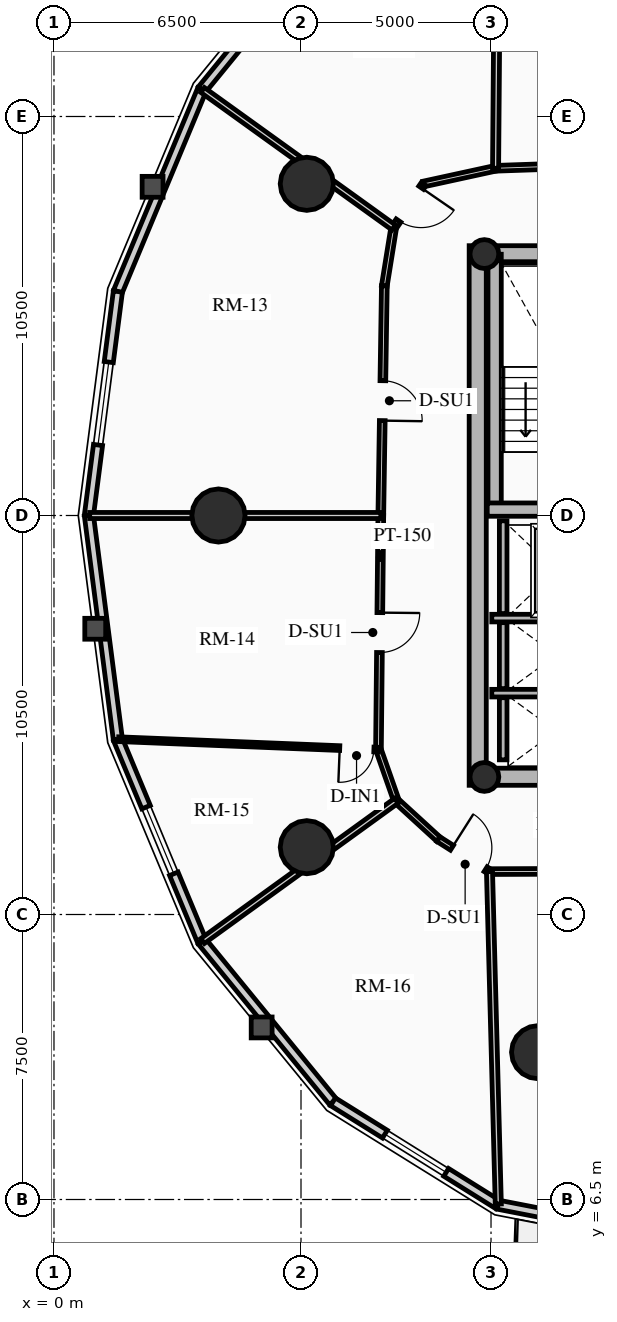
"""IFC4 building model, lengths in metres.
Left out: names, types, materials, properties, quantities, classifications, styles, units other than length and angle.
Written with IfcOpenShell. Run it as: python <this file> out.ifc"""

import sys

from ifc_helpers import new_model, si_unit, direction, frame, frame_2d, origin, origin_2d, place, context, subcontext, project, spatial, rectangle, circle, hollow_circle, extrude, source, transform, mapped, element, fill, save


model = new_model("IFC4")
c1 = context("Model", 3, precision=1e-05, world=origin(), true_north=direction((0.0, 1.0)))
c2 = subcontext(c1, "Body", "Model", "MODEL_VIEW")
j1 = project(units=[si_unit("LENGTHUNIT", "METRE"), si_unit("PLANEANGLEUNIT", "RADIAN")], contexts=[c1])
p1 = place(None, origin())
s1 = spatial("IfcSite", under=j1, at=p1, CompositionType="ELEMENT")
p2 = place(p1, origin())
s2 = spatial("IfcBuilding", under=s1, at=p2, CompositionType="ELEMENT")
p3 = place(p2, frame((0.0, 0.0, 78.88)))
s3 = spatial("IfcBuildingStorey", under=s2, at=p3, CompositionType="ELEMENT", Elevation=78.88)
p4 = place(p3, frame((11.15, 17.4, 0.0), z_axis=(0.0, 0.0, 1.0), x_axis=(0.0, 1.0, 0.0)))
e1 = element("IfcWall", 1, at=p4, inside=s3, PredefinedType="SHEAR", context=c2, shape_type="SweptSolid", body=[
    extrude(rectangle(XDim=14.2, YDim=0.45, at=frame_2d((7.1, 0.0))), origin(), (0.0, 0.0, 1.0), 2.91),
])
p5 = place(p3, frame((11.15, 17.625, 0.0), z_axis=(0.0, 0.0, 1.0), x_axis=(1.0, 0.0, 0.0)))
e2 = element("IfcWall", 2, at=p5, inside=s3, PredefinedType="SHEAR", context=c2, shape_type="SweptSolid", body=[
    extrude(rectangle(XDim=10.7, YDim=0.45, at=frame_2d((5.35, 0.0))), origin(), (0.0, 0.0, 1.0), 2.91),
])
m1 = source(origin(), c2, "Body", "SweptSolid", [
    extrude(rectangle(XDim=1.5, YDim=2.02, at=frame_2d((0.75, 1.01))), frame((0.0, 0.235, 0.0), z_axis=(0.0, -1.0, 0.0), x_axis=(1.0, 0.0, 0.0)), (0.0, 0.0, 1.0), 0.47),
])
p6 = place(p5, frame((5.45, 0.0, 0.0)))
e3 = element("IfcOpeningElement", 3, at=p6, cuts=e2, PredefinedType="OPENING", context=c2, shape_type="MappedRepresentation", body=[
    mapped(m1, transform((0.0, 0.0, 0.0), x_axis=(1.0, 0.0, 0.0), y_axis=(0.0, 1.0, 0.0), z_axis=(0.0, 0.0, 1.0), scale=1.0)),
])
p7 = place(p3, frame((11.15, 31.375, 0.0), z_axis=(0.0, 0.0, 1.0), x_axis=(1.0, 0.0, 0.0)))
e4 = element("IfcWall", 4, at=p7, inside=s3, PredefinedType="SHEAR", context=c2, shape_type="SweptSolid", body=[
    extrude(rectangle(XDim=10.7, YDim=0.45, at=frame_2d((5.35, 0.0))), origin(), (0.0, 0.0, 1.0), 2.91),
])
p8 = place(p7, frame((4.6, 0.0, 0.0)))
e5 = element("IfcOpeningElement", 5, at=p8, cuts=e4, PredefinedType="OPENING", context=c2, shape_type="MappedRepresentation", body=[
    mapped(m1, transform((0.0, 0.0, 0.0), x_axis=(1.0, 0.0, 0.0), y_axis=(0.0, 1.0, 0.0), z_axis=(0.0, 0.0, 1.0), scale=1.0)),
])
p9 = place(p3, frame((11.595, 24.655, 0.0), z_axis=(0.0, 0.0, 1.0), x_axis=(0.0, 1.0, 0.0)))
e6 = element("IfcWall", 6, at=p9, inside=s3, PredefinedType="SHEAR", context=c2, shape_type="SweptSolid", body=[
    extrude(rectangle(XDim=6.72, YDim=0.35, at=frame_2d((3.36, 0.0))), origin(), (0.0, 0.0, 1.0), 2.91),
])
p10 = place(p3, frame((11.4, 24.655, 0.0), z_axis=(0.0, 0.0, 1.0), x_axis=(1.0, 0.0, 0.0)))
e7 = element("IfcWall", 7, at=p10, inside=s3, PredefinedType="SHEAR", context=c2, shape_type="SweptSolid", body=[
    extrude(rectangle(XDim=3.285, YDim=0.35, at=frame_2d((1.643, 0.0))), origin(), (0.0, 0.0, 1.0), 2.91),
])
for number, where, z_axis, x_axis in (
    (8, (11.325, 17.62, 0.0), (0.0, 0.0, 1.0), (1.0, 0.0, 0.0)),
    (9, (11.325, 31.38, 0.0), (0.0, 0.0, 1.0), (1.0, 0.0, 0.0)),
):
    element("IfcColumn", number, at=place(p3, frame(where, z_axis=z_axis, x_axis=x_axis)), inside=s3, PredefinedType="COLUMN", context=c2, shape_type="SweptSolid", body=[
        extrude(hollow_circle(Radius=0.38, WallThickness=0.032, at=origin_2d()), origin(), (0.0, 0.0, 1.0), 2.91),
    ])
for number, where, z_axis, x_axis in (
    (10, (6.653, 33.229, 0.0), (0.0, 0.0, 1.0), (1.0, 0.0, 0.0)),
    (11, (4.328, 24.5, 0.0), (0.0, 0.0, 1.0), (1.0, 0.0, 0.0)),
    (12, (6.653, 15.771, 0.0), (0.0, 0.0, 1.0), (1.0, 0.0, 0.0)),
    (13, (12.739, 10.377, 0.0), (0.0, 0.0, 1.0), (1.0, 0.0, 0.0)),
):
    element("IfcColumn", number, at=place(p3, frame(where, z_axis=z_axis, x_axis=x_axis)), inside=s3, PredefinedType="USERDEFINED", context=c2, shape_type="SweptSolid", body=[
        extrude(circle(Radius=0.7, at=origin_2d()), origin(), (0.0, 0.0, 1.0), 2.91),
    ])
p11 = place(p3, frame((3.895, 35.709, 0.0), z_axis=(0.0, 0.0, 1.0), x_axis=(0.632700781152, 0.77439635945, 0.0)))
e14 = element("IfcWall", 14, at=p11, inside=s3, PredefinedType="SOLIDWALL", context=c2, shape_type="SweptSolid", body=[
    extrude(rectangle(XDim=5.448, YDim=0.24, at=frame_2d((2.724, 0.0))), origin(), (0.0, 0.0, 1.0), 2.179),
])
m2 = source(origin(), c2, "Body", "SweptSolid", [
    extrude(rectangle(XDim=1.9, YDim=1.35, at=frame_2d((0.95, 0.675))), frame((0.0, 0.13, 0.0), z_axis=(0.0, -1.0, 0.0), x_axis=(1.0, 0.0, 0.0)), (0.0, 0.0, 1.0), 0.26),
])
p12 = place(p11, frame((1.774, 0.0, 0.65)))
e15 = element("IfcOpeningElement", 15, at=p12, cuts=e14, PredefinedType="OPENING", context=c2, shape_type="MappedRepresentation", body=[
    mapped(m2, transform((0.0, 0.0, 0.0), x_axis=(1.0, 0.0, 0.0), y_axis=(0.0, 1.0, 0.0), z_axis=(0.0, 0.0, 1.0), scale=1.0)),
])
p13 = place(p3, frame((1.682, 30.393, 0.0), z_axis=(0.0, 0.0, 1.0), x_axis=(0.384344417632, 0.923189779317, 0.0)))
e16 = element("IfcWall", 16, at=p13, inside=s3, PredefinedType="SOLIDWALL", context=c2, shape_type="SweptSolid", body=[
    extrude(rectangle(XDim=5.758, YDim=0.24, at=frame_2d((2.879, 0.0))), origin(), (0.0, 0.0, 1.0), 2.179),
])
p14 = place(p3, frame((0.919, 24.5, 0.0), z_axis=(0.0, 0.0, 1.0), x_axis=(0.128351991996, 0.991728675672, 0.0)))
e17 = element("IfcWall", 17, at=p14, inside=s3, PredefinedType="SOLIDWALL", context=c2, shape_type="SweptSolid", body=[
    extrude(rectangle(XDim=5.942, YDim=0.24, at=frame_2d((2.971, 0.0))), origin(), (0.0, 0.0, 1.0), 2.179),
])
m3 = source(origin(), c2, "Body", "SweptSolid", [
    extrude(rectangle(XDim=2.2, YDim=1.35, at=frame_2d((1.1, 0.675))), frame((0.0, 0.13, 0.0), z_axis=(0.0, -1.0, 0.0), x_axis=(1.0, 0.0, 0.0)), (0.0, 0.0, 1.0), 0.26),
])
p15 = place(p14, frame((1.871, 0.0, 0.65)))
e18 = element("IfcOpeningElement", 18, at=p15, cuts=e17, PredefinedType="OPENING", context=c2, shape_type="MappedRepresentation", body=[
    mapped(m3, transform((0.0, 0.0, 0.0), x_axis=(1.0, 0.0, 0.0), y_axis=(0.0, 1.0, 0.0), z_axis=(0.0, 0.0, 1.0), scale=1.0)),
])
p16 = place(p3, frame((1.682, 18.607, 0.0), z_axis=(0.0, 0.0, 1.0), x_axis=(-0.128351991996, 0.991728675672, 0.0)))
e19 = element("IfcWall", 19, at=p16, inside=s3, PredefinedType="SOLIDWALL", context=c2, shape_type="SweptSolid", body=[
    extrude(rectangle(XDim=5.942, YDim=0.24, at=frame_2d((2.971, 0.0))), origin(), (0.0, 0.0, 1.0), 2.179),
])
p17 = place(p3, frame((3.895, 13.291, 0.0), z_axis=(0.0, 0.0, 1.0), x_axis=(-0.384344417632, 0.923189779317, 0.0)))
e20 = element("IfcWall", 20, at=p17, inside=s3, PredefinedType="SOLIDWALL", context=c2, shape_type="SweptSolid", body=[
    extrude(rectangle(XDim=5.758, YDim=0.24, at=frame_2d((2.879, 0.0))), origin(), (0.0, 0.0, 1.0), 2.179),
])
p18 = place(p17, frame((1.929, 0.0, 0.65)))
e21 = element("IfcOpeningElement", 21, at=p18, cuts=e20, PredefinedType="OPENING", context=c2, shape_type="MappedRepresentation", body=[
    mapped(m2, transform((0.0, 0.0, 0.0), x_axis=(1.0, 0.0, 0.0), y_axis=(0.0, 1.0, 0.0), z_axis=(0.0, 0.0, 1.0), scale=1.0)),
])
p19 = place(p3, frame((7.342, 9.072, 0.0), z_axis=(0.0, 0.0, 1.0), x_axis=(-0.632700781152, 0.77439635945, 0.0)))
e22 = element("IfcWall", 22, at=p19, inside=s3, PredefinedType="SOLIDWALL", context=c2, shape_type="SweptSolid", body=[
    extrude(rectangle(XDim=5.448, YDim=0.24, at=frame_2d((2.724, 0.0))), origin(), (0.0, 0.0, 1.0), 2.179),
])
p20 = place(p3, frame((11.685, 6.363, 0.0), z_axis=(0.0, 0.0, 1.0), x_axis=(-0.848520380187, 0.529162701263, 0.0)))
e23 = element("IfcWall", 23, at=p20, inside=s3, PredefinedType="SOLIDWALL", context=c2, shape_type="SweptSolid", body=[
    extrude(rectangle(XDim=5.119, YDim=0.24, at=frame_2d((2.56, 0.0))), origin(), (0.0, 0.0, 1.0), 2.179),
])
p21 = place(p20, frame((1.609, 0.0, 0.65)))
e24 = element("IfcOpeningElement", 24, at=p21, cuts=e23, PredefinedType="OPENING", context=c2, shape_type="MappedRepresentation", body=[
    mapped(m2, transform((0.0, 0.0, 0.0), x_axis=(1.0, 0.0, 0.0), y_axis=(0.0, 1.0, 0.0), z_axis=(0.0, 0.0, 1.0), scale=1.0)),
])
p22 = place(p3, frame((16.5, 5.43, 0.0), z_axis=(0.0, 0.0, 1.0), x_axis=(-0.981723785992, 0.190311344954, 0.0)))
e25 = element("IfcWall", 25, at=p22, inside=s3, PredefinedType="SOLIDWALL", context=c2, shape_type="SweptSolid", body=[
    extrude(rectangle(XDim=4.904, YDim=0.24, at=frame_2d((2.452, 0.0))), origin(), (0.0, 0.0, 1.0), 2.179),
])
m4 = source(origin(), c2, "Body", "SweptSolid", [
    extrude(rectangle(XDim=1.15, YDim=2.005, at=frame_2d((0.575, 1.002))), frame((0.0, 0.13, 0.0), z_axis=(0.0, -1.0, 0.0), x_axis=(1.0, 0.0, 0.0)), (0.0, 0.0, 1.0), 0.26),
])
p23 = place(p22, frame((1.877, 0.0, 0.0)))
e26 = element("IfcOpeningElement", 26, at=p23, cuts=e25, PredefinedType="OPENING", context=c2, shape_type="MappedRepresentation", body=[
    mapped(m4, transform((0.0, 0.0, 0.0), x_axis=(1.0, 0.0, 0.0), y_axis=(0.0, 1.0, 0.0), z_axis=(0.0, 0.0, 1.0), scale=1.0)),
])
p24 = place(p3, frame((11.52, 21.8, 0.0), z_axis=(0.0, 0.0, 1.0), x_axis=(1.0, 0.0, 0.0)))
e27 = element("IfcWall", 27, at=p24, inside=s3, PredefinedType="SHEAR", context=c2, shape_type="SweptSolid", body=[
    extrude(rectangle(XDim=2.97, YDim=0.2, at=frame_2d((1.485, 0.0))), origin(), (0.0, 0.0, 1.0), 2.91),
])
p25 = place(p3, frame((11.82, 21.92, 0.0), z_axis=(0.0, 0.0, 1.0), x_axis=(0.0, 1.0, 0.0)))
e28 = element("IfcWall", 28, at=p25, inside=s3, PredefinedType="SHEAR", context=c2, shape_type="SweptSolid", body=[
    extrude(rectangle(XDim=2.44, YDim=0.2, at=frame_2d((1.22, 0.0))), origin(), (0.0, 0.0, 1.0), 2.91),
])
p26 = place(p3, frame((11.52, 19.825, 0.0), z_axis=(0.0, 0.0, 1.0), x_axis=(1.0, 0.0, 0.0)))
e29 = element("IfcWall", 29, at=p26, inside=s3, PredefinedType="SHEAR", context=c2, shape_type="SweptSolid", body=[
    extrude(rectangle(XDim=2.97, YDim=0.2, at=frame_2d((1.485, 0.0))), origin(), (0.0, 0.0, 1.0), 2.91),
])
p27 = place(p3, frame((11.82, 19.945, 0.0), z_axis=(0.0, 0.0, 1.0), x_axis=(0.0, 1.0, 0.0)))
e30 = element("IfcWall", 30, at=p27, inside=s3, PredefinedType="SHEAR", context=c2, shape_type="SweptSolid", body=[
    extrude(rectangle(XDim=1.735, YDim=0.2, at=frame_2d((0.867, 0.0))), origin(), (0.0, 0.0, 1.0), 2.91),
])
p28 = place(p3, frame((11.82, 18.07, 0.0), z_axis=(0.0, 0.0, 1.0), x_axis=(0.0, 1.0, 0.0)))
e31 = element("IfcWall", 31, at=p28, inside=s3, PredefinedType="SHEAR", context=c2, shape_type="SweptSolid", body=[
    extrude(rectangle(XDim=1.635, YDim=0.2, at=frame_2d((0.817, 0.0))), origin(), (0.0, 0.0, 1.0), 2.91),
])
p29 = place(p3, frame((18.143, 33.86, 0.0), z_axis=(0.0, 0.0, 1.0), x_axis=(-0.999419208319, -0.034077060363, 0.0)))
e32 = element("IfcWall", 32, at=p29, inside=s3, PredefinedType="PARTITIONING", context=c2, shape_type="SweptSolid", body=[
    extrude(rectangle(XDim=6.527, YDim=0.15, at=frame_2d((3.263, 0.0))), origin(), (0.0, 0.0, 1.0), 2.225),
])
m5 = source(origin(), c2, "Body", "SweptSolid", [
    extrude(rectangle(XDim=1.05, YDim=2.015, at=frame_2d((0.525, 1.007))), frame((0.0, 0.085, 0.0), z_axis=(0.0, -1.0, 0.0), x_axis=(1.0, 0.0, 0.0)), (0.0, 0.0, 1.0), 0.17),
])
p30 = place(p29, frame((2.738, 0.0, 0.0)))
e33 = element("IfcOpeningElement", 33, at=p30, cuts=e32, PredefinedType="OPENING", context=c2, shape_type="MappedRepresentation", body=[
    mapped(m5, transform((0.0, 0.0, 0.0), x_axis=(1.0, 0.0, 0.0), y_axis=(0.0, 1.0, 0.0), z_axis=(0.0, 0.0, 1.0), scale=1.0)),
])
p31 = place(p3, frame((11.62, 33.637, 0.0), z_axis=(0.0, 0.0, 1.0), x_axis=(-0.97702579435, -0.213121085711, 0.0)))
e34 = element("IfcWall", 34, at=p31, inside=s3, PredefinedType="PARTITIONING", context=c2, shape_type="SweptSolid", body=[
    extrude(rectangle(XDim=1.935, YDim=0.15, at=frame_2d((0.967, 0.0))), origin(), (0.0, 0.0, 1.0), 2.225),
])
p32 = place(p3, frame((9.729, 33.225, 0.0), z_axis=(0.0, 0.0, 1.0), x_axis=(-0.567183649484, -0.82359134755, 0.0)))
e35 = element("IfcWall", 35, at=p32, inside=s3, PredefinedType="PARTITIONING", context=c2, shape_type="SweptSolid", body=[
    extrude(rectangle(XDim=1.392, YDim=0.15, at=frame_2d((0.696, 0.0))), origin(), (0.0, 0.0, 1.0), 2.225),
])
p33 = place(p32, frame((0.12, 0.0, 0.0)))
e36 = element("IfcOpeningElement", 36, at=p33, cuts=e35, PredefinedType="OPENING", context=c2, shape_type="MappedRepresentation", body=[
    mapped(m5, transform((0.0, 0.0, 0.0), x_axis=(1.0, 0.0, 0.0), y_axis=(0.0, 1.0, 0.0), z_axis=(0.0, 0.0, 1.0), scale=1.0)),
])
p34 = place(p3, frame((8.94, 32.078, 0.0), z_axis=(0.0, 0.0, 1.0), x_axis=(-0.159148467753, -0.98725466077, 0.0)))
e37 = element("IfcWall", 37, at=p34, inside=s3, PredefinedType="PARTITIONING", context=c2, shape_type="SweptSolid", body=[
    extrude(rectangle(XDim=1.554, YDim=0.15, at=frame_2d((0.777, 0.0))), origin(), (0.0, 0.0, 1.0), 2.225),
])
p35 = place(p3, frame((8.693, 30.544, 0.0), z_axis=(0.0, 0.0, 1.0), x_axis=(-0.015307007986, -0.99988284089, 0.0)))
e38 = element("IfcWall", 38, at=p35, inside=s3, PredefinedType="PARTITIONING", context=c2, shape_type="SweptSolid", body=[
    extrude(rectangle(XDim=6.045, YDim=0.15, at=frame_2d((3.022, 0.0))), origin(), (0.0, 0.0, 1.0), 2.655),
])
p36 = place(p35, frame((2.497, 0.0, 0.0)))
e39 = element("IfcOpeningElement", 39, at=p36, cuts=e38, PredefinedType="OPENING", context=c2, shape_type="MappedRepresentation", body=[
    mapped(m5, transform((0.0, 0.0, 0.0), x_axis=(1.0, 0.0, 0.0), y_axis=(0.0, 1.0, 0.0), z_axis=(0.0, 0.0, 1.0), scale=1.0)),
])
p37 = place(p3, frame((8.6, 24.5, 0.0), z_axis=(0.0, 0.0, 1.0), x_axis=(-0.010023665349, -0.999949761805, 0.0)))
e40 = element("IfcWall", 40, at=p37, inside=s3, PredefinedType="PARTITIONING", context=c2, shape_type="SweptSolid", body=[
    extrude(rectangle(XDim=6.162, YDim=0.15, at=frame_2d((3.081, 0.0))), origin(), (0.0, 0.0, 1.0), 2.225),
])
p38 = place(p37, frame((2.556, 0.0, 0.0)))
e41 = element("IfcOpeningElement", 41, at=p38, cuts=e40, PredefinedType="OPENING", context=c2, shape_type="MappedRepresentation", body=[
    mapped(m5, transform((0.0, 0.0, 0.0), x_axis=(1.0, 0.0, 0.0), y_axis=(0.0, 1.0, 0.0), z_axis=(0.0, 0.0, 1.0), scale=1.0)),
])
p39 = place(p3, frame((8.538, 18.338, 0.0), z_axis=(0.0, 0.0, 1.0), x_axis=(0.331358150167, -0.94350504838, 0.0)))
e42 = element("IfcWall", 42, at=p39, inside=s3, PredefinedType="PARTITIONING", context=c2, shape_type="SweptSolid", body=[
    extrude(rectangle(XDim=1.424, YDim=0.15, at=frame_2d((0.712, 0.0))), origin(), (0.0, 0.0, 1.0), 2.225),
])
p40 = place(p3, frame((9.01, 16.994, 0.0), z_axis=(0.0, 0.0, 1.0), x_axis=(0.737701798986, -0.67512669609, 0.0)))
e43 = element("IfcWall", 43, at=p40, inside=s3, PredefinedType="PARTITIONING", context=c2, shape_type="SweptSolid", body=[
    extrude(rectangle(XDim=1.498, YDim=0.15, at=frame_2d((0.749, 0.0))), origin(), (0.0, 0.0, 1.0), 2.225),
])
p41 = place(p3, frame((10.115, 15.983, 0.0), z_axis=(0.0, 0.0, 1.0), x_axis=(0.843995849351, -0.536349705209, 0.0)))
e44 = element("IfcWall", 44, at=p41, inside=s3, PredefinedType="PARTITIONING", context=c2, shape_type="SweptSolid", body=[
    extrude(rectangle(XDim=1.593, YDim=0.15, at=frame_2d((0.796, 0.0))), origin(), (0.0, 0.0, 1.0), 2.225),
])
p42 = place(p41, frame((0.423, 0.0, 0.0)))
e45 = element("IfcOpeningElement", 45, at=p42, cuts=e44, PredefinedType="OPENING", context=c2, shape_type="MappedRepresentation", body=[
    mapped(m5, transform((0.0, 0.0, 0.0), x_axis=(1.0, 0.0, 0.0), y_axis=(0.0, 1.0, 0.0), z_axis=(0.0, 0.0, 1.0), scale=1.0)),
])
p43 = place(p3, frame((11.46, 15.129, 0.0), z_axis=(0.0, 0.0, 1.0), x_axis=(0.999993513287, 0.003601858435, 0.0)))
e46 = element("IfcWall", 46, at=p43, inside=s3, PredefinedType="PARTITIONING", context=c2, shape_type="SweptSolid", body=[
    extrude(rectangle(XDim=3.321, YDim=0.15, at=frame_2d((1.661, 0.0))), origin(), (0.0, 0.0, 1.0), 2.225),
])
p44 = place(p3, frame((11.62, 33.637, 0.0), z_axis=(0.0, 0.0, 1.0), x_axis=(0.007965167065, 0.999968277554, 0.0)))
e47 = element("IfcWall", 47, at=p44, inside=s3, PredefinedType="PARTITIONING", context=c2, shape_type="SweptSolid", body=[
    extrude(rectangle(XDim=8.981, YDim=0.16, at=frame_2d((4.49, 0.0))), origin(), (0.0, 0.0, 1.0), 2.179),
])
p45 = place(p3, frame((8.94, 32.078, 0.0), z_axis=(0.0, 0.0, 1.0), x_axis=(-0.811689023641, 0.584089829479, 0.0)))
e48 = element("IfcWall", 48, at=p45, inside=s3, PredefinedType="PARTITIONING", context=c2, shape_type="SweptSolid", body=[
    extrude(rectangle(XDim=6.196, YDim=0.16, at=frame_2d((3.098, 0.0))), origin(), (0.0, 0.0, 1.0), 2.179),
])
p46 = place(p3, frame((8.6, 24.5, 0.0), z_axis=(0.0, 0.0, 1.0), x_axis=(-1.0, 0.0, 0.0)))
e49 = element("IfcWall", 49, at=p46, inside=s3, PredefinedType="PARTITIONING", context=c2, shape_type="SweptSolid", body=[
    extrude(rectangle(XDim=7.661, YDim=0.16, at=frame_2d((3.831, 0.0))), origin(), (0.0, 0.0, 1.0), 2.179),
])
p47 = place(p3, frame((9.01, 16.994, 0.0), z_axis=(0.0, 0.0, 1.0), x_axis=(-0.81001707524, -0.586406290741, 0.0)))
e50 = element("IfcWall", 50, at=p47, inside=s3, PredefinedType="PARTITIONING", context=c2, shape_type="SweptSolid", body=[
    extrude(rectangle(XDim=6.295, YDim=0.16, at=frame_2d((3.148, 0.0))), origin(), (0.0, 0.0, 1.0), 2.179),
])
p48 = place(p3, frame((11.46, 15.129, 0.0), z_axis=(0.0, 0.0, 1.0), x_axis=(0.026480592098, -0.999649327636, 0.0)))
e51 = element("IfcWall", 51, at=p48, inside=s3, PredefinedType="PARTITIONING", context=c2, shape_type="SweptSolid", body=[
    extrude(rectangle(XDim=8.75, YDim=0.16, at=frame_2d((4.375, 0.0))), origin(), (0.0, 0.0, 1.0), 2.179),
])
p49 = place(p3, frame((8.538, 18.338, 0.0), z_axis=(0.0, 0.0, 1.0), x_axis=(-0.999191355531, 0.04020740021, 0.0)))
e52 = element("IfcWall", 52, at=p49, inside=s3, PredefinedType="PARTITIONING", context=c2, shape_type="SweptSolid", body=[
    extrude(rectangle(XDim=6.843, YDim=0.125, at=frame_2d((3.422, 0.0))), origin(), (0.0, 0.0, 1.0), 2.179),
])
m6 = source(origin(), c2, "Body", "SweptSolid", [
    extrude(rectangle(XDim=0.9, YDim=2.005, at=frame_2d((0.45, 1.002))), frame((0.0, 0.073, 0.0), z_axis=(0.0, -1.0, 0.0), x_axis=(1.0, 0.0, 0.0)), (0.0, 0.0, 1.0), 0.145),
])
p50 = place(p49, frame((0.12, 0.0, 0.0)))
e53 = element("IfcOpeningElement", 53, at=p50, cuts=e52, PredefinedType="OPENING", context=c2, shape_type="MappedRepresentation", body=[
    mapped(m6, transform((0.0, 0.0, 0.0), x_axis=(1.0, 0.0, 0.0), y_axis=(0.0, 1.0, 0.0), z_axis=(0.0, 0.0, 1.0), scale=1.0)),
])
m7 = source(origin(), c2, "Body", "SweptSolid", [
    extrude(rectangle(XDim=2.2, YDim=1.35, at=frame_2d((1.1, 0.675))), frame((0.0, 0.03, 0.0), z_axis=(0.0, -1.0, 0.0), x_axis=(1.0, 0.0, 0.0)), (0.0, 0.0, 1.0), 0.06),
])
p51 = place(p15, origin())
e54 = element("IfcWindow", 54, at=p51, inside=s3, PartitioningType="DOUBLE_PANEL_VERTICAL", PredefinedType="WINDOW", context=c2, shape_type="MappedRepresentation", body=[
    mapped(m7, transform((0.0, 0.0, 0.0), x_axis=(1.0, 0.0, 0.0), y_axis=(0.0, 1.0, 0.0), z_axis=(0.0, 0.0, 1.0), scale=1.0)),
])
fill(e18, e54)
m8 = source(origin(), c2, "Body", "SweptSolid", [
    extrude(rectangle(XDim=1.9, YDim=1.35, at=frame_2d((0.95, 0.675))), frame((0.0, 0.03, 0.0), z_axis=(0.0, -1.0, 0.0), x_axis=(1.0, 0.0, 0.0)), (0.0, 0.0, 1.0), 0.06),
])
p52 = place(p18, origin())
e55 = element("IfcWindow", 55, at=p52, inside=s3, PartitioningType="DOUBLE_PANEL_VERTICAL", PredefinedType="WINDOW", context=c2, shape_type="MappedRepresentation", body=[
    mapped(m8, transform((0.0, 0.0, 0.0), x_axis=(1.0, 0.0, 0.0), y_axis=(0.0, 1.0, 0.0), z_axis=(0.0, 0.0, 1.0), scale=1.0)),
])
fill(e21, e55)
p53 = place(p21, origin())
e56 = element("IfcWindow", 56, at=p53, inside=s3, PartitioningType="DOUBLE_PANEL_VERTICAL", PredefinedType="WINDOW", context=c2, shape_type="MappedRepresentation", body=[
    mapped(m8, transform((0.0, 0.0, 0.0), x_axis=(1.0, 0.0, 0.0), y_axis=(0.0, 1.0, 0.0), z_axis=(0.0, 0.0, 1.0), scale=1.0)),
])
fill(e24, e56)
m9 = source(origin(), c2, "Body", "SweptSolid", [
    extrude(rectangle(XDim=1.05, YDim=2.015, at=frame_2d((0.525, 1.007))), frame((0.0, 0.025, 0.0), z_axis=(0.0, -1.0, 0.0), x_axis=(1.0, 0.0, 0.0)), (0.0, 0.0, 1.0), 0.05),
])
p54 = place(p33, origin())
e57 = element("IfcDoor", 57, at=p54, inside=s3, OperationType="SINGLE_SWING_LEFT", PredefinedType="DOOR", context=c2, shape_type="MappedRepresentation", body=[
    mapped(m9, transform((0.0, 0.0, 0.0), x_axis=(1.0, 0.0, 0.0), y_axis=(0.0, 1.0, 0.0), z_axis=(0.0, 0.0, 1.0), scale=1.0)),
])
fill(e36, e57)
p55 = place(p36, origin())
e58 = element("IfcDoor", 58, at=p55, inside=s3, OperationType="SINGLE_SWING_RIGHT", PredefinedType="DOOR", context=c2, shape_type="MappedRepresentation", body=[
    mapped(m9, transform((0.0, 0.0, 0.0), x_axis=(1.0, 0.0, 0.0), y_axis=(0.0, 1.0, 0.0), z_axis=(0.0, 0.0, 1.0), scale=1.0)),
])
fill(e39, e58)
p56 = place(p38, origin())
e59 = element("IfcDoor", 59, at=p56, inside=s3, OperationType="SINGLE_SWING_LEFT", PredefinedType="DOOR", context=c2, shape_type="MappedRepresentation", body=[
    mapped(m9, transform((0.0, 0.0, 0.0), x_axis=(1.0, 0.0, 0.0), y_axis=(0.0, 1.0, 0.0), z_axis=(0.0, 0.0, 1.0), scale=1.0)),
])
fill(e41, e59)
m10 = source(origin(), c2, "Body", "SweptSolid", [
    extrude(rectangle(XDim=0.9, YDim=2.005, at=frame_2d((0.45, 1.002))), frame((0.0, 0.025, 0.0), z_axis=(0.0, -1.0, 0.0), x_axis=(1.0, 0.0, 0.0)), (0.0, 0.0, 1.0), 0.05),
])
p57 = place(p50, origin())
e60 = element("IfcDoor", 60, at=p57, inside=s3, OperationType="SINGLE_SWING_RIGHT", PredefinedType="DOOR", context=c2, shape_type="MappedRepresentation", body=[
    mapped(m10, transform((0.0, 0.0, 0.0), x_axis=(1.0, 0.0, 0.0), y_axis=(0.0, 1.0, 0.0), z_axis=(0.0, 0.0, 1.0), scale=1.0)),
])
fill(e53, e60)
p58 = place(p42, origin())
e61 = element("IfcDoor", 61, at=p58, inside=s3, OperationType="SINGLE_SWING_LEFT", PredefinedType="DOOR", context=c2, shape_type="MappedRepresentation", body=[
    mapped(m9, transform((0.0, 0.0, 0.0), x_axis=(1.0, 0.0, 0.0), y_axis=(0.0, 1.0, 0.0), z_axis=(0.0, 0.0, 1.0), scale=1.0)),
])
fill(e45, e61)
save(model, sys.argv[1])
